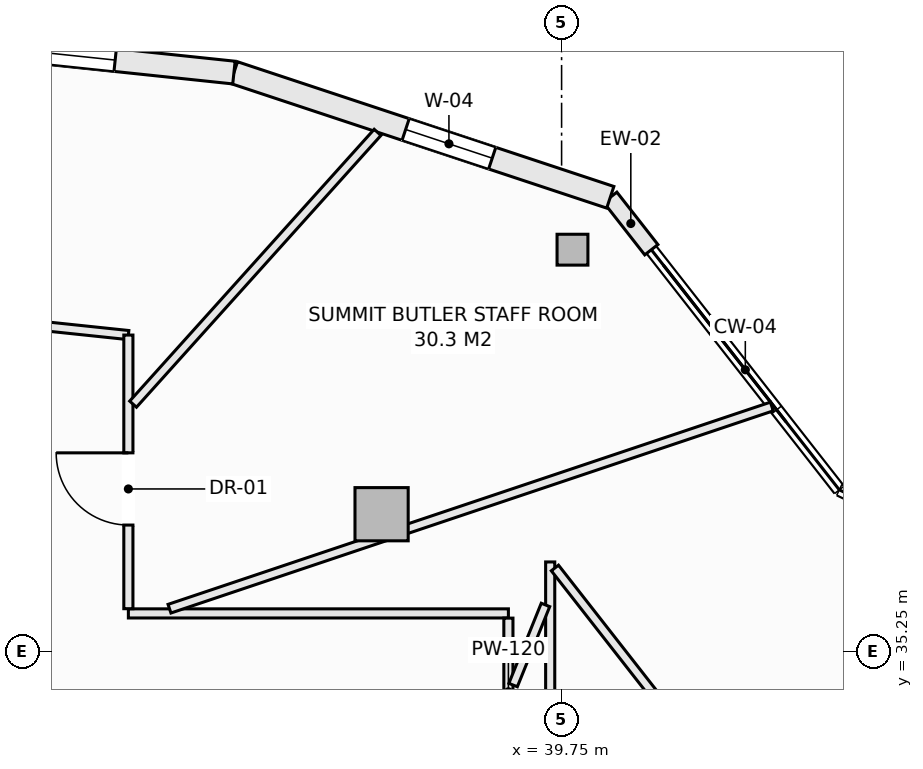
"""IFC4 building model, lengths in metres.
Left out: names, types, materials, properties, quantities, classifications, styles, units other than length and angle.
Written with IfcOpenShell. Run it as: python <this file> out.ifc"""

import sys

from ifc_helpers import new_model, si_unit, direction, frame, frame_2d, origin, origin_2d, place, context, subcontext, project, spatial, rectangle, hollow_rectangle, extrude, element, fill, save


model = new_model("IFC4")
c1 = context("Model", 3, precision=1e-05, world=origin(), true_north=direction((0.0, 1.0)))
c2 = subcontext(c1, "Body", "Model", "MODEL_VIEW")
j1 = project(units=[si_unit("LENGTHUNIT", "METRE"), si_unit("PLANEANGLEUNIT", "RADIAN")], contexts=[c1])
p1 = place(None, origin())
s1 = spatial("IfcSite", under=j1, at=p1, CompositionType="ELEMENT")
p2 = place(p1, origin())
s2 = spatial("IfcBuilding", under=s1, at=p2, CompositionType="ELEMENT")
p3 = place(p2, frame((0.0, 0.0, 272.3)))
s3 = spatial("IfcBuildingStorey", under=s2, at=p3, CompositionType="ELEMENT", Elevation=272.3)
p4 = place(p3, frame((39.893, 40.535, -0.27), z_axis=(0.0, 0.0, 1.0), x_axis=(1.0, 0.0, 0.0)))
e1 = element("IfcColumn", 1, at=p4, inside=s3, PredefinedType="COLUMN", context=c2, shape_type="SweptSolid", body=[
    extrude(hollow_rectangle(XDim=0.406, YDim=0.406, WallThickness=0.016, at=origin_2d()), origin(), (0.0, 0.0, 1.0), 3.25),
])
p5 = place(p3, frame((37.382, 37.055, -0.27), z_axis=(0.0, 0.0, 1.0), x_axis=(1.0, 0.0, 0.0)))
e2 = element("IfcColumn", 2, at=p5, inside=s3, PredefinedType="COLUMN", context=c2, shape_type="SweptSolid", body=[
    extrude(rectangle(XDim=0.7, YDim=0.7, at=origin_2d()), origin(), (0.0, 0.0, 1.0), 3.25),
])
p6 = place(p3, frame((40.391, 41.225, 0.0), z_axis=(0.0, 0.0, 1.0), x_axis=(0.616368366719, -0.787457958566, 0.0)))
e3 = element("IfcWall", 3, at=p6, inside=s3, PredefinedType="SOLIDWALL", context=c2, shape_type="SweptSolid", body=[
    extrude(rectangle(XDim=0.876, YDim=0.22, at=frame_2d((0.438, 0.0))), origin(), (0.0, 0.0, 1.0), 2.555),
])
p7 = place(p3, frame((35.439, 42.865, 0.0), z_axis=(0.0, 0.0, 1.0), x_axis=(0.949252744709, -0.314514271001, 0.0)))
e4 = element("IfcWall", 4, at=p7, inside=s3, PredefinedType="SOLIDWALL", context=c2, shape_type="SweptSolid", body=[
    extrude(rectangle(XDim=5.216, YDim=0.3, at=frame_2d((2.608, 0.0))), origin(), (0.0, 0.0, 1.0), 2.555),
])
p8 = place(p7, frame((2.38, 0.0, 0.72)))
e5 = element("IfcOpeningElement", 5, at=p8, cuts=e4, PredefinedType="OPENING", context=c2, shape_type="SweptSolid", body=[
    extrude(rectangle(XDim=1.2, YDim=1.65, at=frame_2d((0.6, 0.825))), frame((0.0, 0.16, 0.0), z_axis=(0.0, -1.0, 0.0), x_axis=(1.0, 0.0, 0.0)), (0.0, 0.0, 1.0), 0.32),
])
p9 = place(p3, frame((30.125, 43.425, 0.0), z_axis=(0.0, 0.0, 1.0), x_axis=(0.9944966869, -0.104768028258, 0.0)))
e6 = element("IfcWall", 6, at=p9, inside=s3, PredefinedType="SOLIDWALL", context=c2, shape_type="SweptSolid", body=[
    extrude(rectangle(XDim=5.343, YDim=0.3, at=frame_2d((2.672, 0.0))), origin(), (0.0, 0.0, 1.0), 2.555),
])
p10 = place(p9, frame((1.572, 0.0, 0.72)))
e7 = element("IfcOpeningElement", 7, at=p10, cuts=e6, PredefinedType="OPENING", context=c2, shape_type="SweptSolid", body=[
    extrude(rectangle(XDim=2.2, YDim=1.65, at=frame_2d((1.1, 0.825))), frame((0.0, 0.16, 0.0), z_axis=(0.0, -1.0, 0.0), x_axis=(1.0, 0.0, 0.0)), (0.0, 0.0, 1.0), 0.32),
])
p11 = place(p3, frame((34.05, 35.75, 0.0), z_axis=(0.0, 0.0, 1.0), x_axis=(1.0, 0.0, 0.0)))
e8 = element("IfcWall", 8, at=p11, inside=s3, PredefinedType="PARTITIONING", context=c2, shape_type="SweptSolid", body=[
    extrude(rectangle(XDim=5.0, YDim=0.12, at=frame_2d((2.5, 0.0))), origin(), (0.0, 0.0, 1.0), 2.428),
])
p12 = place(p3, frame((32.212, 39.605, 0.0), z_axis=(0.0, 0.0, 1.0), x_axis=(0.994512688404, -0.1046160246, 0.0)))
e9 = element("IfcWall", 9, at=p12, inside=s3, PredefinedType="PARTITIONING", context=c2, shape_type="SweptSolid", body=[
    extrude(rectangle(XDim=1.848, YDim=0.12, at=frame_2d((0.924, 0.0))), origin(), (0.0, 0.0, 1.0), 2.98),
])
p13 = place(p3, frame((34.05, 35.812, 0.0), z_axis=(0.0, 0.0, 1.0), x_axis=(0.0, 1.0, 0.0)))
e10 = element("IfcWall", 10, at=p13, inside=s3, PredefinedType="PARTITIONING", context=c2, shape_type="SweptSolid", body=[
    extrude(rectangle(XDim=3.6, YDim=0.12, at=frame_2d((1.8, 0.0))), origin(), (0.0, 0.0, 1.0), 2.72),
])
p14 = place(p13, frame((1.1, 0.0, 0.0)))
e11 = element("IfcOpeningElement", 11, at=p14, cuts=e10, PredefinedType="OPENING", context=c2, shape_type="SweptSolid", body=[
    extrude(rectangle(XDim=0.95, YDim=2.1, at=frame_2d((0.475, 1.05))), frame((0.0, 0.07, 0.0), z_axis=(0.0, -1.0, 0.0), x_axis=(1.0, 0.0, 0.0)), (0.0, 0.0, 1.0), 0.14),
])
p15 = place(p3, frame((39.05, 33.75, 0.0), z_axis=(0.0, 0.0, 1.0), x_axis=(0.0, 1.0, 0.0)))
e12 = element("IfcWall", 12, at=p15, inside=s3, PredefinedType="PARTITIONING", context=c2, shape_type="SweptSolid", body=[
    extrude(rectangle(XDim=1.938, YDim=0.12, at=frame_2d((0.969, 0.0))), origin(), (0.0, 0.0, 1.0), 2.98),
])
p16 = place(p3, frame((39.6, 31.182, 0.0), z_axis=(0.0, 0.0, 1.0), x_axis=(0.0, 1.0, 0.0)))
e13 = element("IfcWall", 13, at=p16, inside=s3, PredefinedType="PARTITIONING", context=c2, shape_type="SweptSolid", body=[
    extrude(rectangle(XDim=5.245, YDim=0.12, at=frame_2d((2.623, 0.0))), origin(), (0.0, 0.0, 1.0), 2.98),
])
p17 = place(p3, frame((39.662, 36.348, 0.0), z_axis=(0.0, 0.0, 1.0), x_axis=(0.616212345115, -0.78758005671, 0.0)))
e14 = element("IfcWall", 14, at=p17, inside=s3, PredefinedType="PARTITIONING", context=c2, shape_type="SweptSolid", body=[
    extrude(rectangle(XDim=2.333, YDim=0.12, at=frame_2d((1.167, 0.0))), origin(), (0.0, 0.0, 1.0), 2.98),
])
p18 = place(p3, frame((34.591, 35.812, 0.0), z_axis=(0.0, 0.0, 1.0), x_axis=(0.94801826347, 0.318215920605, 0.0)))
e15 = element("IfcWall", 15, at=p18, inside=s3, PredefinedType="PARTITIONING", context=c2, shape_type="SweptSolid", body=[
    extrude(rectangle(XDim=8.36, YDim=0.12, at=frame_2d((4.18, 0.0))), origin(), (0.0, 0.0, 1.0), 2.98),
])
p19 = place(p3, frame((39.112, 34.808, 0.0), z_axis=(0.0, 0.0, 1.0), x_axis=(0.374757755012, 0.927122766983, 0.0)))
e16 = element("IfcWall", 16, at=p19, inside=s3, PredefinedType="PARTITIONING", context=c2, shape_type="SweptSolid", body=[
    extrude(rectangle(XDim=1.137, YDim=0.12, at=frame_2d((0.568, 0.0))), origin(), (0.0, 0.0, 1.0), 2.98),
])
p20 = place(p3, frame((34.112, 38.503, 0.0), z_axis=(0.0, 0.0, 1.0), x_axis=(0.668788041067, 0.743453129744, 0.0)))
e17 = element("IfcWall", 17, at=p20, inside=s3, PredefinedType="PARTITIONING", context=c2, shape_type="SweptSolid", body=[
    extrude(rectangle(XDim=4.81, YDim=0.12, at=frame_2d((2.405, 0.0))), origin(), (0.0, 0.0, 1.0), 2.98),
])
p21 = place(p8, origin())
e18 = element("IfcWindow", 18, at=p21, inside=s3, PartitioningType="SINGLE_PANEL", PredefinedType="WINDOW", context=c2, shape_type="SweptSolid", body=[
    extrude(rectangle(XDim=1.2, YDim=1.65, at=frame_2d((0.6, 0.825))), frame((0.0, 0.03, 0.0), z_axis=(0.0, -1.0, 0.0), x_axis=(1.0, 0.0, 0.0)), (0.0, 0.0, 1.0), 0.06),
])
fill(e5, e18)
p22 = place(p10, origin())
e19 = element("IfcWindow", 19, at=p22, inside=s3, PartitioningType="SINGLE_PANEL", PredefinedType="WINDOW", context=c2, shape_type="SweptSolid", body=[
    extrude(rectangle(XDim=2.2, YDim=1.65, at=frame_2d((1.1, 0.825))), frame((0.0, 0.03, 0.0), z_axis=(0.0, -1.0, 0.0), x_axis=(1.0, 0.0, 0.0)), (0.0, 0.0, 1.0), 0.06),
])
fill(e7, e19)
p23 = place(p14, origin())
e20 = element("IfcDoor", 20, at=p23, inside=s3, OperationType="SINGLE_SWING_RIGHT", PredefinedType="DOOR", context=c2, shape_type="SweptSolid", body=[
    extrude(rectangle(XDim=0.95, YDim=2.1, at=frame_2d((0.475, 1.05))), frame((0.0, 0.025, 0.0), z_axis=(0.0, -1.0, 0.0), x_axis=(1.0, 0.0, 0.0)), (0.0, 0.0, 1.0), 0.05),
])
fill(e11, e20)
save(model, sys.argv[1])
